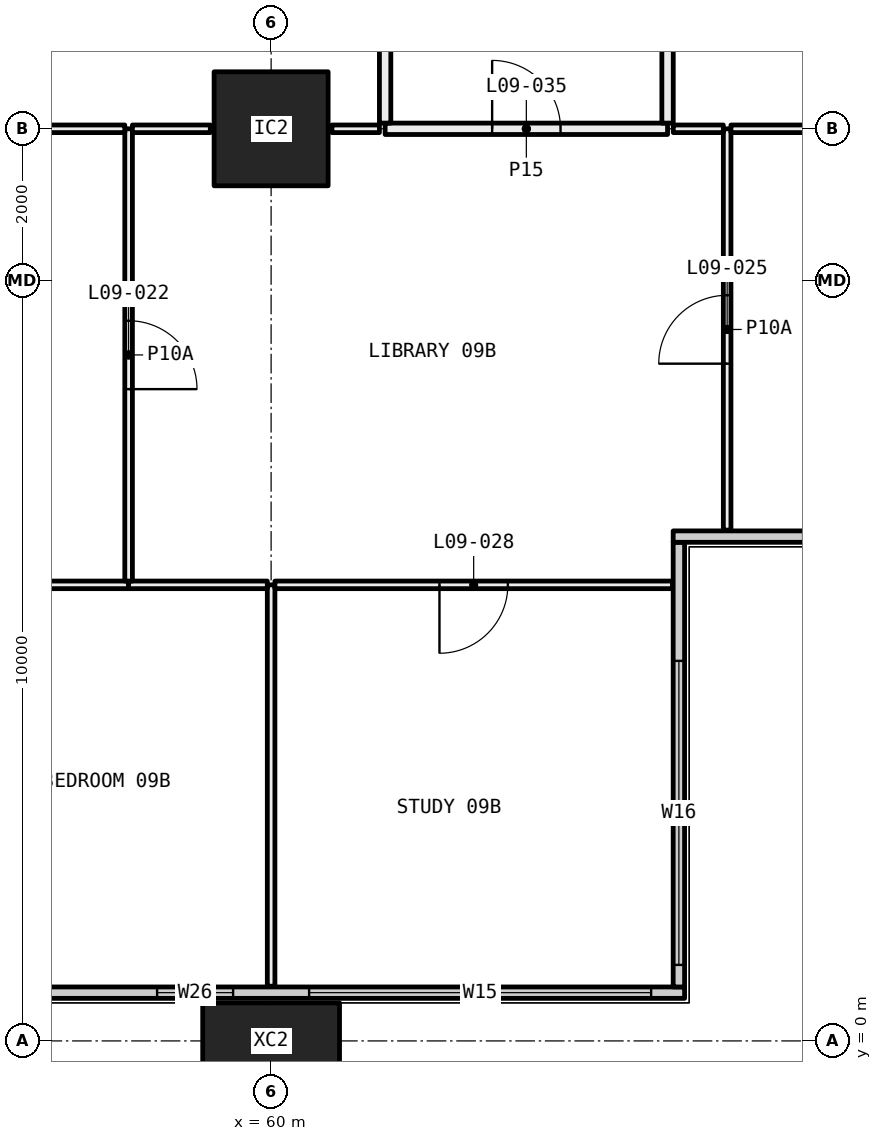
"""IFC4 building model, lengths in metres.
Left out: names, types, materials, properties, quantities, classifications, styles, units other than length and angle.
Written with IfcOpenShell. Run it as: python <this file> out.ifc"""

import sys

from ifc_helpers import new_model, si_unit, direction, frame, frame_2d, origin, origin_2d, place, context, subcontext, project, spatial, rectangle, hollow_rectangle, extrude, element, fill, save


model = new_model("IFC4")
c1 = context("Model", 3, precision=1e-05, world=origin(), true_north=direction((0.0, 1.0)))
c2 = subcontext(c1, "Body", "Model", "MODEL_VIEW")
j1 = project(units=[si_unit("LENGTHUNIT", "METRE"), si_unit("PLANEANGLEUNIT", "RADIAN")], contexts=[c1])
p1 = place(None, origin())
s1 = spatial("IfcSite", under=j1, at=p1, CompositionType="ELEMENT")
p2 = place(p1, origin())
s2 = spatial("IfcBuilding", under=s1, at=p2, CompositionType="ELEMENT")
p3 = place(p2, frame((0.0, 0.0, 43.8)))
s3 = spatial("IfcBuildingStorey", under=s2, at=p3, CompositionType="ELEMENT", Elevation=43.8)
p4 = place(p3, frame((60.0, 0.0, -0.4), z_axis=(0.0, 0.0, 1.0), x_axis=(1.0, 0.0, 0.0)))
e1 = element("IfcColumn", 1, at=p4, inside=s3, PredefinedType="COLUMN", context=c2, shape_type="SweptSolid", body=[
    extrude(hollow_rectangle(XDim=1.8, YDim=1.0, WallThickness=0.07, at=origin_2d()), origin(), (0.0, 0.0, 1.0), 3.45),
])
p5 = place(p3, frame((60.0, 12.0, 0.0), z_axis=(0.0, 0.0, 1.0), x_axis=(1.0, 0.0, 0.0)))
e2 = element("IfcColumn", 2, at=p5, inside=s3, PredefinedType="COLUMN", context=c2, shape_type="SweptSolid", body=[
    extrude(hollow_rectangle(XDim=1.5, YDim=1.5, WallThickness=0.065, at=origin_2d()), origin(), (0.0, 0.0, 1.0), 3.05),
])
p6 = place(p3, frame((6.56, 0.635, 0.0), z_axis=(0.0, 0.0, 1.0), x_axis=(1.0, 0.0, 0.0)))
e3 = element("IfcWall", 3, at=p6, inside=s3, PredefinedType="ELEMENTEDWALL", context=c2, shape_type="SweptSolid", body=[
    extrude(rectangle(XDim=58.88, YDim=0.15, at=frame_2d((29.44, 0.0))), origin(), (0.0, 0.0, 1.0), 3.05),
])
p7 = place(p6, frame((0.44, 0.0, 0.45)))
e4 = element("IfcOpeningElement", 4, at=p7, cuts=e3, PredefinedType="OPENING", context=c2, shape_type="SweptSolid", body=[
    extrude(rectangle(XDim=4.5, YDim=2.55, at=frame_2d((2.25, 1.275))), frame((0.0, 0.085, 0.0), z_axis=(0.0, -1.0, 0.0), x_axis=(1.0, 0.0, 0.0)), (0.0, 0.0, 1.0), 0.17),
])
p8 = place(p6, frame((5.94, 0.0, 0.45)))
e5 = element("IfcOpeningElement", 5, at=p8, cuts=e3, PredefinedType="OPENING", context=c2, shape_type="SweptSolid", body=[
    extrude(rectangle(XDim=1.0, YDim=2.55, at=frame_2d((0.5, 1.275))), frame((0.0, 0.085, 0.0), z_axis=(0.0, -1.0, 0.0), x_axis=(1.0, 0.0, 0.0)), (0.0, 0.0, 1.0), 0.17),
])
p9 = place(p6, frame((9.69, 0.0, 0.45)))
e6 = element("IfcOpeningElement", 6, at=p9, cuts=e3, PredefinedType="OPENING", context=c2, shape_type="SweptSolid", body=[
    extrude(rectangle(XDim=1.25, YDim=2.55, at=frame_2d((0.625, 1.275))), frame((0.0, 0.085, 0.0), z_axis=(0.0, -1.0, 0.0), x_axis=(1.0, 0.0, 0.0)), (0.0, 0.0, 1.0), 0.17),
])
p10 = place(p6, frame((11.94, 0.0, 0.45)))
e7 = element("IfcOpeningElement", 7, at=p10, cuts=e3, PredefinedType="OPENING", context=c2, shape_type="SweptSolid", body=[
    extrude(rectangle(XDim=1.25, YDim=2.55, at=frame_2d((0.625, 1.275))), frame((0.0, 0.085, 0.0), z_axis=(0.0, -1.0, 0.0), x_axis=(1.0, 0.0, 0.0)), (0.0, 0.0, 1.0), 0.17),
])
p11 = place(p6, frame((15.94, 0.0, 0.45)))
e8 = element("IfcOpeningElement", 8, at=p11, cuts=e3, PredefinedType="OPENING", context=c2, shape_type="SweptSolid", body=[
    extrude(rectangle(XDim=1.0, YDim=2.55, at=frame_2d((0.5, 1.275))), frame((0.0, 0.085, 0.0), z_axis=(0.0, -1.0, 0.0), x_axis=(1.0, 0.0, 0.0)), (0.0, 0.0, 1.0), 0.17),
])
p12 = place(p6, frame((17.94, 0.0, 0.45)))
e9 = element("IfcOpeningElement", 9, at=p12, cuts=e3, PredefinedType="OPENING", context=c2, shape_type="SweptSolid", body=[
    extrude(rectangle(XDim=1.0, YDim=2.55, at=frame_2d((0.5, 1.275))), frame((0.0, 0.085, 0.0), z_axis=(0.0, -1.0, 0.0), x_axis=(1.0, 0.0, 0.0)), (0.0, 0.0, 1.0), 0.17),
])
p13 = place(p6, frame((21.69, 0.0, 0.45)))
e10 = element("IfcOpeningElement", 10, at=p13, cuts=e3, PredefinedType="OPENING", context=c2, shape_type="SweptSolid", body=[
    extrude(rectangle(XDim=1.25, YDim=2.55, at=frame_2d((0.625, 1.275))), frame((0.0, 0.085, 0.0), z_axis=(0.0, -1.0, 0.0), x_axis=(1.0, 0.0, 0.0)), (0.0, 0.0, 1.0), 0.17),
])
p14 = place(p6, frame((23.94, 0.0, 0.45)))
e11 = element("IfcOpeningElement", 11, at=p14, cuts=e3, PredefinedType="OPENING", context=c2, shape_type="SweptSolid", body=[
    extrude(rectangle(XDim=1.25, YDim=2.55, at=frame_2d((0.625, 1.275))), frame((0.0, 0.085, 0.0), z_axis=(0.0, -1.0, 0.0), x_axis=(1.0, 0.0, 0.0)), (0.0, 0.0, 1.0), 0.17),
])
p15 = place(p6, frame((27.94, 0.0, 0.45)))
e12 = element("IfcOpeningElement", 12, at=p15, cuts=e3, PredefinedType="OPENING", context=c2, shape_type="SweptSolid", body=[
    extrude(rectangle(XDim=1.0, YDim=2.55, at=frame_2d((0.5, 1.275))), frame((0.0, 0.085, 0.0), z_axis=(0.0, -1.0, 0.0), x_axis=(1.0, 0.0, 0.0)), (0.0, 0.0, 1.0), 0.17),
])
p16 = place(p6, frame((29.94, 0.0, 0.45)))
e13 = element("IfcOpeningElement", 13, at=p16, cuts=e3, PredefinedType="OPENING", context=c2, shape_type="SweptSolid", body=[
    extrude(rectangle(XDim=1.0, YDim=2.55, at=frame_2d((0.5, 1.275))), frame((0.0, 0.085, 0.0), z_axis=(0.0, -1.0, 0.0), x_axis=(1.0, 0.0, 0.0)), (0.0, 0.0, 1.0), 0.17),
])
p17 = place(p6, frame((33.69, 0.0, 0.45)))
e14 = element("IfcOpeningElement", 14, at=p17, cuts=e3, PredefinedType="OPENING", context=c2, shape_type="SweptSolid", body=[
    extrude(rectangle(XDim=1.25, YDim=2.55, at=frame_2d((0.625, 1.275))), frame((0.0, 0.085, 0.0), z_axis=(0.0, -1.0, 0.0), x_axis=(1.0, 0.0, 0.0)), (0.0, 0.0, 1.0), 0.17),
])
p18 = place(p6, frame((35.94, 0.0, 0.45)))
e15 = element("IfcOpeningElement", 15, at=p18, cuts=e3, PredefinedType="OPENING", context=c2, shape_type="SweptSolid", body=[
    extrude(rectangle(XDim=1.25, YDim=2.55, at=frame_2d((0.625, 1.275))), frame((0.0, 0.085, 0.0), z_axis=(0.0, -1.0, 0.0), x_axis=(1.0, 0.0, 0.0)), (0.0, 0.0, 1.0), 0.17),
])
p19 = place(p6, frame((39.94, 0.0, 0.45)))
e16 = element("IfcOpeningElement", 16, at=p19, cuts=e3, PredefinedType="OPENING", context=c2, shape_type="SweptSolid", body=[
    extrude(rectangle(XDim=1.0, YDim=2.55, at=frame_2d((0.5, 1.275))), frame((0.0, 0.085, 0.0), z_axis=(0.0, -1.0, 0.0), x_axis=(1.0, 0.0, 0.0)), (0.0, 0.0, 1.0), 0.17),
])
p20 = place(p6, frame((41.94, 0.0, 0.45)))
e17 = element("IfcOpeningElement", 17, at=p20, cuts=e3, PredefinedType="OPENING", context=c2, shape_type="SweptSolid", body=[
    extrude(rectangle(XDim=1.0, YDim=2.55, at=frame_2d((0.5, 1.275))), frame((0.0, 0.085, 0.0), z_axis=(0.0, -1.0, 0.0), x_axis=(1.0, 0.0, 0.0)), (0.0, 0.0, 1.0), 0.17),
])
p21 = place(p6, frame((45.69, 0.0, 0.45)))
e18 = element("IfcOpeningElement", 18, at=p21, cuts=e3, PredefinedType="OPENING", context=c2, shape_type="SweptSolid", body=[
    extrude(rectangle(XDim=1.25, YDim=2.55, at=frame_2d((0.625, 1.275))), frame((0.0, 0.085, 0.0), z_axis=(0.0, -1.0, 0.0), x_axis=(1.0, 0.0, 0.0)), (0.0, 0.0, 1.0), 0.17),
])
p22 = place(p6, frame((47.94, 0.0, 0.45)))
e19 = element("IfcOpeningElement", 19, at=p22, cuts=e3, PredefinedType="OPENING", context=c2, shape_type="SweptSolid", body=[
    extrude(rectangle(XDim=1.25, YDim=2.55, at=frame_2d((0.625, 1.275))), frame((0.0, 0.085, 0.0), z_axis=(0.0, -1.0, 0.0), x_axis=(1.0, 0.0, 0.0)), (0.0, 0.0, 1.0), 0.17),
])
p23 = place(p6, frame((51.94, 0.0, 0.45)))
e20 = element("IfcOpeningElement", 20, at=p23, cuts=e3, PredefinedType="OPENING", context=c2, shape_type="SweptSolid", body=[
    extrude(rectangle(XDim=1.0, YDim=2.55, at=frame_2d((0.5, 1.275))), frame((0.0, 0.085, 0.0), z_axis=(0.0, -1.0, 0.0), x_axis=(1.0, 0.0, 0.0)), (0.0, 0.0, 1.0), 0.17),
])
p24 = place(p6, frame((53.94, 0.0, 0.45)))
e21 = element("IfcOpeningElement", 21, at=p24, cuts=e3, PredefinedType="OPENING", context=c2, shape_type="SweptSolid", body=[
    extrude(rectangle(XDim=4.5, YDim=2.55, at=frame_2d((2.25, 1.275))), frame((0.0, 0.085, 0.0), z_axis=(0.0, -1.0, 0.0), x_axis=(1.0, 0.0, 0.0)), (0.0, 0.0, 1.0), 0.17),
])
p25 = place(p3, frame((65.365, 0.71, 0.0), z_axis=(0.0, 0.0, 1.0), x_axis=(0.0, 1.0, 0.0)))
e22 = element("IfcWall", 22, at=p25, inside=s3, PredefinedType="ELEMENTEDWALL", context=c2, shape_type="SweptSolid", body=[
    extrude(rectangle(XDim=5.85, YDim=0.15, at=frame_2d((2.925, 0.0))), origin(), (0.0, 0.0, 1.0), 3.05),
])
p26 = place(p25, frame((0.29, 0.0, 0.45)))
e23 = element("IfcOpeningElement", 23, at=p26, cuts=e22, PredefinedType="OPENING", context=c2, shape_type="SweptSolid", body=[
    extrude(rectangle(XDim=4.0, YDim=2.55, at=frame_2d((2.0, 1.275))), frame((0.0, 0.085, 0.0), z_axis=(0.0, -1.0, 0.0), x_axis=(1.0, 0.0, 0.0)), (0.0, 0.0, 1.0), 0.17),
])
p27 = place(p3, frame((65.29, 6.635, 0.0), z_axis=(0.0, 0.0, 1.0), x_axis=(1.0, 0.0, 0.0)))
e24 = element("IfcWall", 24, at=p27, inside=s3, PredefinedType="ELEMENTEDWALL", context=c2, shape_type="SweptSolid", body=[
    extrude(rectangle(XDim=6.15, YDim=0.15, at=frame_2d((3.075, 0.0))), origin(), (0.0, 0.0, 1.0), 3.05),
])
p28 = place(p27, frame((1.71, 0.0, 0.45)))
e25 = element("IfcOpeningElement", 25, at=p28, cuts=e24, PredefinedType="OPENING", context=c2, shape_type="SweptSolid", body=[
    extrude(rectangle(XDim=4.0, YDim=2.55, at=frame_2d((2.0, 1.275))), frame((0.0, 0.085, 0.0), z_axis=(0.0, -1.0, 0.0), x_axis=(1.0, 0.0, 0.0)), (0.0, 0.0, 1.0), 0.17),
])
p29 = place(p3, frame((60.0, 0.72, 0.0), z_axis=(0.0, 0.0, 1.0), x_axis=(0.0, 1.0, 0.0)))
e26 = element("IfcWall", 26, at=p29, inside=s3, PredefinedType="PARTITIONING", context=c2, shape_type="SweptSolid", body=[
    extrude(rectangle(XDim=5.28, YDim=0.1, at=frame_2d((2.64, 0.0))), origin(), (0.0, 0.0, 1.0), 2.45),
])
p30 = place(p3, frame((58.125, 6.0, 0.0), z_axis=(0.0, 0.0, 1.0), x_axis=(-1.0, 0.0, 0.0)))
e27 = element("IfcWall", 27, at=p30, inside=s3, PredefinedType="PARTITIONING", context=c2, shape_type="SweptSolid", body=[
    extrude(rectangle(XDim=4.075, YDim=0.1, at=frame_2d((2.038, 0.0))), origin(), (0.0, 0.0, 1.0), 3.05),
])
p31 = place(p3, frame((59.95, 6.0, 0.0), z_axis=(0.0, 0.0, 1.0), x_axis=(-1.0, 0.0, 0.0)))
e28 = element("IfcWall", 28, at=p31, inside=s3, PredefinedType="PARTITIONING", context=c2, shape_type="SweptSolid", body=[
    extrude(rectangle(XDim=1.825, YDim=0.1, at=frame_2d((0.913, 0.0))), origin(), (0.0, 0.0, 1.0), 2.45),
])
p32 = place(p3, frame((65.28, 6.0, 0.0), z_axis=(0.0, 0.0, 1.0), x_axis=(-1.0, 0.0, 0.0)))
e29 = element("IfcWall", 29, at=p32, inside=s3, PredefinedType="PARTITIONING", context=c2, shape_type="SweptSolid", body=[
    extrude(rectangle(XDim=5.23, YDim=0.1, at=frame_2d((2.615, 0.0))), origin(), (0.0, 0.0, 1.0), 2.45),
])
p33 = place(p32, frame((2.165, 0.0, 0.0)))
e30 = element("IfcOpeningElement", 30, at=p33, cuts=e29, PredefinedType="OPENING", context=c2, shape_type="SweptSolid", body=[
    extrude(rectangle(XDim=0.9, YDim=2.1, at=frame_2d((0.45, 1.05))), frame((0.0, 0.06, 0.0), z_axis=(0.0, -1.0, 0.0), x_axis=(1.0, 0.0, 0.0)), (0.0, 0.0, 1.0), 0.12),
])
p34 = place(p3, frame((58.125, 6.05, 0.0), z_axis=(0.0, 0.0, 1.0), x_axis=(0.0, 1.0, 0.0)))
e31 = element("IfcWall", 31, at=p34, inside=s3, PredefinedType="PARTITIONING", context=c2, shape_type="SweptSolid", body=[
    extrude(rectangle(XDim=5.95, YDim=0.1, at=frame_2d((2.975, 0.0))), origin(), (0.0, 0.0, 1.0), 2.45),
])
p35 = place(p34, frame((2.525, 0.0, 0.0)))
e32 = element("IfcOpeningElement", 32, at=p35, cuts=e31, PredefinedType="OPENING", context=c2, shape_type="SweptSolid", body=[
    extrude(rectangle(XDim=0.9, YDim=2.1, at=frame_2d((0.45, 1.05))), frame((0.0, 0.06, 0.0), z_axis=(0.0, -1.0, 0.0), x_axis=(1.0, 0.0, 0.0)), (0.0, 0.0, 1.0), 0.12),
])
p36 = place(p3, frame((58.075, 12.0, 0.0), z_axis=(0.0, 0.0, 1.0), x_axis=(-1.0, 0.0, 0.0)))
e33 = element("IfcWall", 33, at=p36, inside=s3, PredefinedType="PARTITIONING", context=c2, shape_type="SweptSolid", body=[
    extrude(rectangle(XDim=5.575, YDim=0.1, at=frame_2d((2.788, 0.0))), origin(), (0.0, 0.0, 1.0), 2.45),
])
p37 = place(p3, frame((66.0, 6.72, 0.0), z_axis=(0.0, 0.0, 1.0), x_axis=(0.0, 1.0, 0.0)))
e34 = element("IfcWall", 34, at=p37, inside=s3, PredefinedType="PARTITIONING", context=c2, shape_type="SweptSolid", body=[
    extrude(rectangle(XDim=5.28, YDim=0.1, at=frame_2d((2.64, 0.0))), origin(), (0.0, 0.0, 1.0), 2.45),
])
p38 = place(p37, frame((2.19, 0.0, 0.0)))
e35 = element("IfcOpeningElement", 35, at=p38, cuts=e34, PredefinedType="OPENING", context=c2, shape_type="SweptSolid", body=[
    extrude(rectangle(XDim=0.9, YDim=2.1, at=frame_2d((0.45, 1.05))), frame((0.0, 0.06, 0.0), z_axis=(0.0, -1.0, 0.0), x_axis=(1.0, 0.0, 0.0)), (0.0, 0.0, 1.0), 0.12),
])
p39 = place(p3, frame((59.2, 12.0, 0.0), z_axis=(0.0, 0.0, 1.0), x_axis=(-1.0, 0.0, 0.0)))
e36 = element("IfcWall", 36, at=p39, inside=s3, PredefinedType="PARTITIONING", context=c2, shape_type="SweptSolid", body=[
    extrude(rectangle(XDim=1.025, YDim=0.1, at=frame_2d((0.512, 0.0))), origin(), (0.0, 0.0, 1.0), 2.45),
])
p40 = place(p3, frame((61.425, 12.0, 0.0), z_axis=(0.0, 0.0, 1.0), x_axis=(-1.0, 0.0, 0.0)))
e37 = element("IfcWall", 37, at=p40, inside=s3, PredefinedType="PARTITIONING", context=c2, shape_type="SweptSolid", body=[
    extrude(rectangle(XDim=0.625, YDim=0.1, at=frame_2d((0.312, 0.0))), origin(), (0.0, 0.0, 1.0), 2.45),
])
p41 = place(p3, frame((65.95, 12.0, 0.0), z_axis=(0.0, 0.0, 1.0), x_axis=(-1.0, 0.0, 0.0)))
e38 = element("IfcWall", 38, at=p41, inside=s3, PredefinedType="PARTITIONING", context=c2, shape_type="SweptSolid", body=[
    extrude(rectangle(XDim=0.659, YDim=0.1, at=frame_2d((0.33, 0.0))), origin(), (0.0, 0.0, 1.0), 2.45),
])
p42 = place(p3, frame((65.216, 12.0, 0.0), z_axis=(0.0, 0.0, 1.0), x_axis=(-1.0, 0.0, 0.0)))
e39 = element("IfcWall", 39, at=p42, inside=s3, PredefinedType="PARTITIONING", context=c2, shape_type="SweptSolid", body=[
    extrude(rectangle(XDim=3.716, YDim=0.15, at=frame_2d((1.858, 0.0))), origin(), (0.0, 0.0, 1.0), 2.45),
])
p43 = place(p42, frame((1.408, 0.0, 0.0)))
e40 = element("IfcOpeningElement", 40, at=p43, cuts=e39, PredefinedType="OPENING", context=c2, shape_type="SweptSolid", body=[
    extrude(rectangle(XDim=0.9, YDim=2.1, at=frame_2d((0.45, 1.05))), frame((0.0, 0.085, 0.0), z_axis=(0.0, -1.0, 0.0), x_axis=(1.0, 0.0, 0.0)), (0.0, 0.0, 1.0), 0.17),
])
p44 = place(p3, frame((71.28, 12.0, 0.0), z_axis=(0.0, 0.0, 1.0), x_axis=(-1.0, 0.0, 0.0)))
e41 = element("IfcWall", 41, at=p44, inside=s3, PredefinedType="PARTITIONING", context=c2, shape_type="SweptSolid", body=[
    extrude(rectangle(XDim=5.23, YDim=0.1, at=frame_2d((2.615, 0.0))), origin(), (0.0, 0.0, 1.0), 2.45),
])
p45 = place(p44, frame((2.165, 0.0, 0.0)))
e42 = element("IfcOpeningElement", 42, at=p45, cuts=e41, PredefinedType="OPENING", context=c2, shape_type="SweptSolid", body=[
    extrude(rectangle(XDim=0.9, YDim=2.1, at=frame_2d((0.45, 1.05))), frame((0.0, 0.06, 0.0), z_axis=(0.0, -1.0, 0.0), x_axis=(1.0, 0.0, 0.0)), (0.0, 0.0, 1.0), 0.12),
])
for number, where, z_axis, x_axis in (
    (43, (61.5, 12.075, 0.0), (0.0, 0.0, 1.0), (0.0, 1.0, 0.0)),
    (44, (65.216, 15.229, 0.0), (0.0, 0.0, 1.0), (0.0, -1.0, 0.0)),
):
    element("IfcWall", number, at=place(p3, frame(where, z_axis=z_axis, x_axis=x_axis)), inside=s3, PredefinedType="PARTITIONING", context=c2, shape_type="SweptSolid", body=[
        extrude(rectangle(XDim=3.154, YDim=0.15, at=frame_2d((1.577, 0.0))), origin(), (0.0, 0.0, 1.0), 2.45),
    ])
p46 = place(p23, origin())
e45 = element("IfcWindow", 45, at=p46, inside=s3, PartitioningType="SINGLE_PANEL", PredefinedType="WINDOW", context=c2, shape_type="SweptSolid", body=[
    extrude(rectangle(XDim=1.0, YDim=2.55, at=frame_2d((0.5, 1.275))), frame((0.0, 0.03, 0.0), z_axis=(0.0, -1.0, 0.0), x_axis=(1.0, 0.0, 0.0)), (0.0, 0.0, 1.0), 0.06),
])
fill(e20, e45)
p47 = place(p24, origin())
e46 = element("IfcWindow", 46, at=p47, inside=s3, PartitioningType="SINGLE_PANEL", PredefinedType="WINDOW", context=c2, shape_type="SweptSolid", body=[
    extrude(rectangle(XDim=4.5, YDim=2.55, at=frame_2d((2.25, 1.275))), frame((0.0, 0.03, 0.0), z_axis=(0.0, -1.0, 0.0), x_axis=(1.0, 0.0, 0.0)), (0.0, 0.0, 1.0), 0.06),
])
fill(e21, e46)
p48 = place(p26, origin())
e47 = element("IfcWindow", 47, at=p48, inside=s3, PartitioningType="SINGLE_PANEL", PredefinedType="WINDOW", context=c2, shape_type="SweptSolid", body=[
    extrude(rectangle(XDim=4.0, YDim=2.55, at=frame_2d((2.0, 1.275))), frame((0.0, 0.03, 0.0), z_axis=(0.0, -1.0, 0.0), x_axis=(1.0, 0.0, 0.0)), (0.0, 0.0, 1.0), 0.06),
])
fill(e23, e47)
p49 = place(p35, frame((0.9, 0.0, 0.0), x_axis=(-1.0, 0.0, 0.0)))
e48 = element("IfcDoor", 48, at=p49, inside=s3, OperationType="SINGLE_SWING_LEFT", PredefinedType="DOOR", context=c2, shape_type="SweptSolid", body=[
    extrude(rectangle(XDim=0.9, YDim=2.1, at=frame_2d((0.45, 1.05))), frame((0.0, 0.025, 0.0), z_axis=(0.0, -1.0, 0.0), x_axis=(1.0, 0.0, 0.0)), (0.0, 0.0, 1.0), 0.05),
])
fill(e32, e48)
p50 = place(p38, origin())
e49 = element("IfcDoor", 49, at=p50, inside=s3, OperationType="SINGLE_SWING_RIGHT", PredefinedType="DOOR", context=c2, shape_type="SweptSolid", body=[
    extrude(rectangle(XDim=0.9, YDim=2.1, at=frame_2d((0.45, 1.05))), frame((0.0, 0.025, 0.0), z_axis=(0.0, -1.0, 0.0), x_axis=(1.0, 0.0, 0.0)), (0.0, 0.0, 1.0), 0.05),
])
fill(e35, e49)
p51 = place(p33, origin())
e50 = element("IfcDoor", 50, at=p51, inside=s3, OperationType="SINGLE_SWING_LEFT", PredefinedType="DOOR", context=c2, shape_type="SweptSolid", body=[
    extrude(rectangle(XDim=0.9, YDim=2.1, at=frame_2d((0.45, 1.05))), frame((0.0, 0.025, 0.0), z_axis=(0.0, -1.0, 0.0), x_axis=(1.0, 0.0, 0.0)), (0.0, 0.0, 1.0), 0.05),
])
fill(e30, e50)
p52 = place(p43, frame((0.9, 0.0, 0.0), x_axis=(-1.0, 0.0, 0.0)))
e51 = element("IfcDoor", 51, at=p52, inside=s3, OperationType="SINGLE_SWING_RIGHT", PredefinedType="DOOR", context=c2, shape_type="SweptSolid", body=[
    extrude(rectangle(XDim=0.9, YDim=2.1, at=frame_2d((0.45, 1.05))), frame((0.0, 0.025, 0.0), z_axis=(0.0, -1.0, 0.0), x_axis=(1.0, 0.0, 0.0)), (0.0, 0.0, 1.0), 0.05),
])
fill(e40, e51)
save(model, sys.argv[1])
